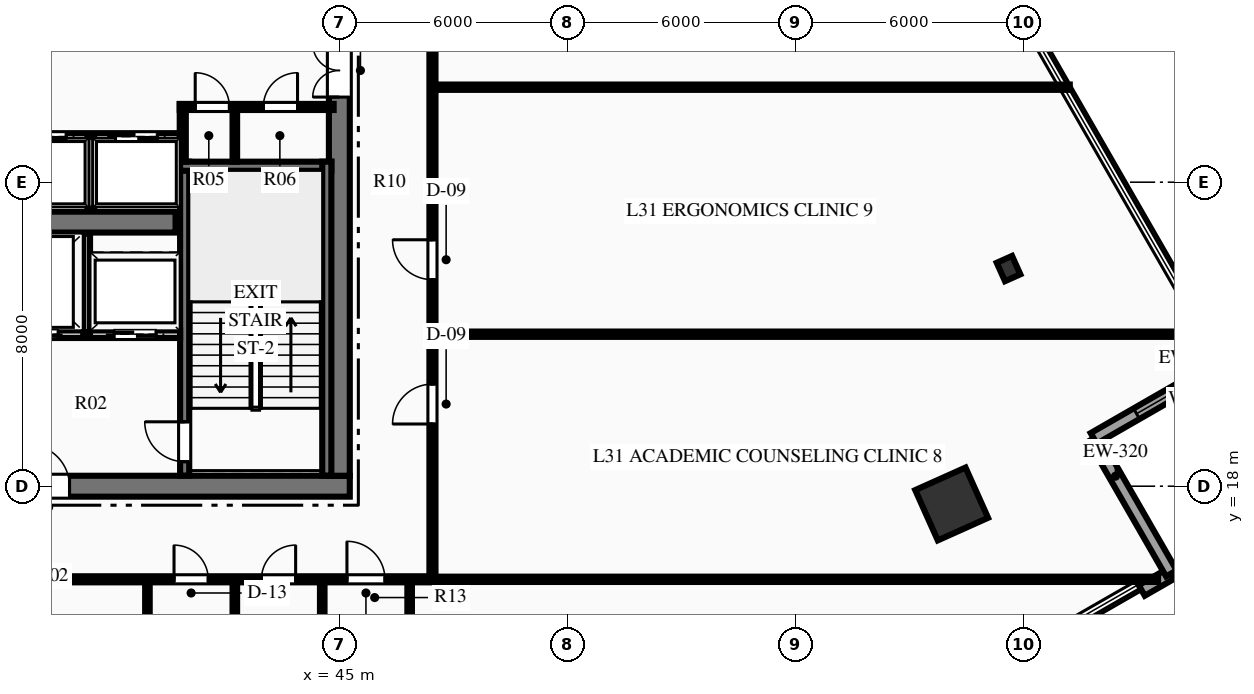
"""IFC4 building model, lengths in metres.
Left out: names, types, materials, properties, quantities, classifications, styles, units other than length and angle.
Written with IfcOpenShell. Run it as: python <this file> out.ifc"""

import sys

from ifc_helpers import new_model, si_unit, direction, frame, frame_2d, origin, origin_2d, place, context, subcontext, project, spatial, rectangle, hollow_rectangle, i_section, extrude, element, fill, save


model = new_model("IFC4")
c1 = context("Model", 3, precision=1e-05, world=origin(), true_north=direction((0.0, 1.0)))
c2 = subcontext(c1, "Body", "Model", "MODEL_VIEW")
j1 = project(units=[si_unit("LENGTHUNIT", "METRE"), si_unit("PLANEANGLEUNIT", "RADIAN")], contexts=[c1])
p1 = place(None, origin())
s1 = spatial("IfcSite", under=j1, at=p1, CompositionType="ELEMENT")
p2 = place(p1, origin())
s2 = spatial("IfcBuilding", under=s1, at=p2, CompositionType="ELEMENT")
p3 = place(p2, frame((0.0, 0.0, 127.95)))
s3 = spatial("IfcBuildingStorey", under=s2, at=p3, CompositionType="ELEMENT", Elevation=127.95)
p4 = place(p3, frame((26.725, 18.0, 0.0), z_axis=(0.0, 0.0, 1.0), x_axis=(1.0, 0.0, 0.0)))
e1 = element("IfcWall", 1, at=p4, inside=s3, PredefinedType="SHEAR", context=c2, shape_type="SweptSolid", body=[
    extrude(rectangle(XDim=18.55, YDim=0.55, at=frame_2d((9.275, 0.0))), origin(), (0.0, 0.0, 1.0), 3.75),
])
p5 = place(p4, frame((7.375, 0.0, 0.0)))
e2 = element("IfcOpeningElement", 2, at=p5, cuts=e1, PredefinedType="OPENING", context=c2, shape_type="SweptSolid", body=[
    extrude(rectangle(XDim=1.1, YDim=2.15, at=frame_2d((0.55, 1.075))), frame((0.0, 0.285, 0.0), z_axis=(0.0, -1.0, 0.0), x_axis=(1.0, 0.0, 0.0)), (0.0, 0.0, 1.0), 0.57),
])
p6 = place(p4, frame((10.075, 0.0, 0.0)))
e3 = element("IfcOpeningElement", 3, at=p6, cuts=e1, PredefinedType="OPENING", context=c2, shape_type="SweptSolid", body=[
    extrude(rectangle(XDim=1.1, YDim=2.15, at=frame_2d((0.55, 1.075))), frame((0.0, 0.285, 0.0), z_axis=(0.0, -1.0, 0.0), x_axis=(1.0, 0.0, 0.0)), (0.0, 0.0, 1.0), 0.57),
])
p7 = place(p3, frame((45.0, 18.275, 0.0), z_axis=(0.0, 0.0, 1.0), x_axis=(0.0, 1.0, 0.0)))
e4 = element("IfcWall", 4, at=p7, inside=s3, PredefinedType="SHEAR", context=c2, shape_type="SweptSolid", body=[
    extrude(rectangle(XDim=15.45, YDim=0.55, at=frame_2d((7.725, 0.0))), origin(), (0.0, 0.0, 1.0), 3.75),
])
p8 = place(p7, frame((9.965, 0.0, 0.0)))
e5 = element("IfcOpeningElement", 5, at=p8, cuts=e4, PredefinedType="OPENING", context=c2, shape_type="SweptSolid", body=[
    extrude(rectangle(XDim=1.4, YDim=2.2, at=frame_2d((0.7, 1.1))), frame((0.0, 0.285, 0.0), z_axis=(0.0, -1.0, 0.0), x_axis=(1.0, 0.0, 0.0)), (0.0, 0.0, 1.0), 0.57),
])
p9 = place(p3, frame((31.31, 24.95, 0.0), z_axis=(0.0, 0.0, 1.0), x_axis=(1.0, 0.0, 0.0)))
e6 = element("IfcWall", 6, at=p9, inside=s3, PredefinedType="SHEAR", context=c2, shape_type="SweptSolid", body=[
    extrude(rectangle(XDim=9.38, YDim=0.55, at=frame_2d((4.69, 0.0))), origin(), (0.0, 0.0, 1.0), 3.75),
])
p10 = place(p3, frame((40.93, 18.28, 0.0), z_axis=(0.0, 0.0, 1.0), x_axis=(0.0, 1.0, 0.0)))
e7 = element("IfcWall", 7, at=p10, inside=s3, PredefinedType="SHEAR", context=c2, shape_type="SweptSolid", body=[
    extrude(rectangle(XDim=8.26, YDim=0.24, at=frame_2d((4.13, 0.0))), origin(), (0.0, 0.0, 1.0), 3.75),
])
p11 = place(p10, frame((0.365, 0.0, 0.0)))
e8 = element("IfcOpeningElement", 8, at=p11, cuts=e7, PredefinedType="OPENING", context=c2, shape_type="SweptSolid", body=[
    extrude(rectangle(XDim=1.05, YDim=2.15, at=frame_2d((0.525, 1.075))), frame((0.0, 0.13, 0.0), z_axis=(0.0, -1.0, 0.0), x_axis=(1.0, 0.0, 0.0)), (0.0, 0.0, 1.0), 0.26),
])
p12 = place(p3, frame((40.81, 26.42, 0.0), z_axis=(0.0, 0.0, 1.0), x_axis=(1.0, 0.0, 0.0)))
e9 = element("IfcWall", 9, at=p12, inside=s3, PredefinedType="SHEAR", context=c2, shape_type="SweptSolid", body=[
    extrude(rectangle(XDim=3.98, YDim=0.24, at=frame_2d((1.99, 0.0))), origin(), (0.0, 0.0, 1.0), 3.75),
])
p13 = place(p3, frame((44.67, 18.28, 0.0), z_axis=(0.0, 0.0, 1.0), x_axis=(0.0, 1.0, 0.0)))
e10 = element("IfcWall", 10, at=p13, inside=s3, PredefinedType="SHEAR", context=c2, shape_type="SweptSolid", body=[
    extrude(rectangle(XDim=8.26, YDim=0.24, at=frame_2d((4.13, 0.0))), origin(), (0.0, 0.0, 1.0), 3.75),
])
p14 = place(p3, frame((61.112, 17.533, 0.0), z_axis=(0.0, 0.0, 1.0), x_axis=(0.912477494148, 0.409126902895, 0.0)))
e11 = element("IfcColumn", 11, at=p14, inside=s3, PredefinedType="COLUMN", context=c2, shape_type="SweptSolid", body=[
    extrude(hollow_rectangle(XDim=1.45, YDim=1.45, WallThickness=0.07, at=origin_2d()), origin(), (0.0, 0.0, 1.0), 3.75),
])
p15 = place(p3, frame((62.609, 23.727, 0.0), z_axis=(0.0, 0.0, 1.0), x_axis=(0.912477494148, 0.409126902895, 0.0)))
e12 = element("IfcColumn", 12, at=p15, inside=s3, PredefinedType="COLUMN", context=c2, shape_type="SweptSolid", body=[
    extrude(i_section(OverallWidth=0.442, OverallDepth=0.531, WebThickness=0.066, FlangeThickness=0.106, at=origin_2d()), origin(), (0.0, 0.0, 1.0), 3.75),
])
p16 = place(p3, frame((66.894, 15.705, 0.0), z_axis=(0.0, 0.0, 1.0), x_axis=(-0.866871138283, -0.498532275396, 0.0)))
e13 = element("IfcWall", 13, at=p16, inside=s3, PredefinedType="STANDARD", context=c2, shape_type="SweptSolid", body=[
    extrude(rectangle(XDim=0.9, YDim=0.32, at=frame_2d((0.45, 0.0))), origin(), (0.0, 0.0, 1.0), 3.4),
])
p17 = place(p3, frame((64.85, 19.259, 0.0), z_axis=(0.0, 0.0, 1.0), x_axis=(0.498522586698, -0.866876710122, 0.0)))
e14 = element("IfcWall", 14, at=p17, inside=s3, PredefinedType="STANDARD", context=c2, shape_type="SweptSolid", body=[
    extrude(rectangle(XDim=4.1, YDim=0.32, at=frame_2d((2.05, 0.0))), origin(), (0.0, 0.0, 1.0), 3.4),
])
p18 = place(p3, frame((68.405, 21.303, 0.0), z_axis=(0.0, 0.0, 1.0), x_axis=(-0.866917238564, -0.498452105503, 0.0)))
e15 = element("IfcWall", 15, at=p18, inside=s3, PredefinedType="STANDARD", context=c2, shape_type="SweptSolid", body=[
    extrude(rectangle(XDim=4.1, YDim=0.32, at=frame_2d((2.05, 0.0))), origin(), (0.0, 0.0, 1.0), 3.4),
])
p19 = place(p18, frame((1.3, 0.0, 0.85)))
e16 = element("IfcOpeningElement", 16, at=p19, cuts=e15, PredefinedType="OPENING", context=c2, shape_type="SweptSolid", body=[
    extrude(rectangle(XDim=1.5, YDim=2.1, at=frame_2d((0.75, 1.05))), frame((0.0, 0.17, 0.0), z_axis=(0.0, -1.0, 0.0), x_axis=(1.0, 0.0, 0.0)), (0.0, 0.0, 1.0), 0.34),
])
p20 = place(p3, frame((36.12, 22.0, 0.0), z_axis=(0.0, 0.0, 1.0), x_axis=(1.0, 0.0, 0.0)))
e17 = element("IfcWall", 17, at=p20, inside=s3, PredefinedType="PARTITIONING", context=c2, shape_type="SweptSolid", body=[
    extrude(rectangle(XDim=4.69, YDim=0.2, at=frame_2d((2.345, 0.0))), origin(), (0.0, 0.0, 1.0), 3.4),
])
p21 = place(p20, frame((2.955, 0.0, 0.0)))
e18 = element("IfcOpeningElement", 18, at=p21, cuts=e17, PredefinedType="OPENING", context=c2, shape_type="SweptSolid", body=[
    extrude(rectangle(XDim=1.1, YDim=2.15, at=frame_2d((0.55, 1.075))), frame((0.0, 0.11, 0.0), z_axis=(0.0, -1.0, 0.0), x_axis=(1.0, 0.0, 0.0)), (0.0, 0.0, 1.0), 0.22),
])
p22 = place(p20, frame((0.08, 0.0, 0.0)))
e19 = element("IfcOpeningElement", 19, at=p22, cuts=e17, PredefinedType="OPENING", context=c2, shape_type="SweptSolid", body=[
    extrude(rectangle(XDim=1.4, YDim=2.2, at=frame_2d((0.7, 1.1))), frame((0.0, 0.11, 0.0), z_axis=(0.0, -1.0, 0.0), x_axis=(1.0, 0.0, 0.0)), (0.0, 0.0, 1.0), 0.22),
])
p23 = place(p3, frame((38.35, 22.05, 0.0), z_axis=(0.0, 0.0, 1.0), x_axis=(0.0, 1.0, 0.0)))
e20 = element("IfcWall", 20, at=p23, inside=s3, PredefinedType="PARTITIONING", context=c2, shape_type="SweptSolid", body=[
    extrude(rectangle(XDim=2.6, YDim=0.18, at=frame_2d((1.3, 0.0))), origin(), (0.0, 0.0, 1.0), 3.4),
])
p24 = place(p3, frame((40.8, 27.98, 0.0), z_axis=(0.0, 0.0, 1.0), x_axis=(1.0, 0.0, 0.0)))
e21 = element("IfcWall", 21, at=p24, inside=s3, PredefinedType="PARTITIONING", context=c2, shape_type="SweptSolid", body=[
    extrude(rectangle(XDim=4.05, YDim=0.16, at=frame_2d((2.025, 0.0))), origin(), (0.0, 0.0, 1.0), 3.4),
])
p25 = place(p24, frame((0.407, 0.0, 0.0)))
e22 = element("IfcOpeningElement", 22, at=p25, cuts=e21, PredefinedType="OPENING", context=c2, shape_type="SweptSolid", body=[
    extrude(rectangle(XDim=0.9, YDim=2.15, at=frame_2d((0.45, 1.075))), frame((0.0, 0.09, 0.0), z_axis=(0.0, -1.0, 0.0), x_axis=(1.0, 0.0, 0.0)), (0.0, 0.0, 1.0), 0.18),
])
p26 = place(p24, frame((2.2, 0.0, 0.0)))
e23 = element("IfcOpeningElement", 23, at=p26, cuts=e21, PredefinedType="OPENING", context=c2, shape_type="SweptSolid", body=[
    extrude(rectangle(XDim=0.9, YDim=2.15, at=frame_2d((0.45, 1.075))), frame((0.0, 0.09, 0.0), z_axis=(0.0, -1.0, 0.0), x_axis=(1.0, 0.0, 0.0)), (0.0, 0.0, 1.0), 0.18),
])
p27 = place(p3, frame((40.88, 26.54, 0.0), z_axis=(0.0, 0.0, 1.0), x_axis=(0.0, 1.0, 0.0)))
e24 = element("IfcWall", 24, at=p27, inside=s3, PredefinedType="PARTITIONING", context=c2, shape_type="SweptSolid", body=[
    extrude(rectangle(XDim=1.51, YDim=0.16, at=frame_2d((0.755, 0.0))), origin(), (0.0, 0.0, 1.0), 3.4),
])
p28 = place(p3, frame((42.25, 26.54, 0.0), z_axis=(0.0, 0.0, 1.0), x_axis=(0.0, 1.0, 0.0)))
e25 = element("IfcWall", 25, at=p28, inside=s3, PredefinedType="PARTITIONING", context=c2, shape_type="SweptSolid", body=[
    extrude(rectangle(XDim=1.44, YDim=0.12, at=frame_2d((0.72, 0.0))), origin(), (0.0, 0.0, 1.0), 3.4),
])
p29 = place(p3, frame((31.2, 27.2, 0.0), z_axis=(0.0, 0.0, 1.0), x_axis=(1.0, 0.0, 0.0)))
e26 = element("IfcWall", 26, at=p29, inside=s3, PredefinedType="PARTITIONING", context=c2, shape_type="SweptSolid", body=[
    extrude(rectangle(XDim=9.6, YDim=0.18, at=frame_2d((4.8, 0.0))), origin(), (0.0, 0.0, 1.0), 3.4),
])
p30 = place(p29, frame((0.59, 0.0, 0.0)))
e27 = element("IfcOpeningElement", 27, at=p30, cuts=e26, PredefinedType="OPENING", context=c2, shape_type="SweptSolid", body=[
    extrude(rectangle(XDim=1.1, YDim=2.15, at=frame_2d((0.55, 1.075))), frame((0.0, 0.1, 0.0), z_axis=(0.0, -1.0, 0.0), x_axis=(1.0, 0.0, 0.0)), (0.0, 0.0, 1.0), 0.2),
])
p31 = place(p29, frame((2.99, 0.0, 0.0)))
e28 = element("IfcOpeningElement", 28, at=p31, cuts=e26, PredefinedType="OPENING", context=c2, shape_type="SweptSolid", body=[
    extrude(rectangle(XDim=1.1, YDim=2.15, at=frame_2d((0.55, 1.075))), frame((0.0, 0.1, 0.0), z_axis=(0.0, -1.0, 0.0), x_axis=(1.0, 0.0, 0.0)), (0.0, 0.0, 1.0), 0.2),
])
p32 = place(p29, frame((5.51, 0.0, 0.0)))
e29 = element("IfcOpeningElement", 29, at=p32, cuts=e26, PredefinedType="OPENING", context=c2, shape_type="SweptSolid", body=[
    extrude(rectangle(XDim=1.1, YDim=2.15, at=frame_2d((0.55, 1.075))), frame((0.0, 0.1, 0.0), z_axis=(0.0, -1.0, 0.0), x_axis=(1.0, 0.0, 0.0)), (0.0, 0.0, 1.0), 0.2),
])
p33 = place(p29, frame((7.91, 0.0, 0.0)))
e30 = element("IfcOpeningElement", 30, at=p33, cuts=e26, PredefinedType="OPENING", context=c2, shape_type="SweptSolid", body=[
    extrude(rectangle(XDim=1.1, YDim=2.15, at=frame_2d((0.55, 1.075))), frame((0.0, 0.1, 0.0), z_axis=(0.0, -1.0, 0.0), x_axis=(1.0, 0.0, 0.0)), (0.0, 0.0, 1.0), 0.2),
])
p34 = place(p3, frame((38.46, 25.3, 0.0), z_axis=(0.0, 0.0, 1.0), x_axis=(0.0, 1.0, 0.0)))
e31 = element("IfcWall", 31, at=p34, inside=s3, PredefinedType="PARTITIONING", context=c2, shape_type="SweptSolid", body=[
    extrude(rectangle(XDim=1.9, YDim=0.18, at=frame_2d((0.95, 0.0))), origin(), (0.0, 0.0, 1.0), 3.4),
])
p35 = place(p3, frame((24.5, 15.55, 0.0), z_axis=(0.0, 0.0, 1.0), x_axis=(1.0, 0.0, 0.0)))
e32 = element("IfcWall", 32, at=p35, inside=s3, PredefinedType="PARTITIONING", context=c2, shape_type="SweptSolid", body=[
    extrude(rectangle(XDim=23.0, YDim=0.16, at=frame_2d((11.5, 0.0))), origin(), (0.0, 0.0, 1.0), 3.4),
])
p36 = place(p35, frame((16.15, 0.0, 0.0)))
e33 = element("IfcOpeningElement", 33, at=p36, cuts=e32, PredefinedType="OPENING", context=c2, shape_type="SweptSolid", body=[
    extrude(rectangle(XDim=0.9, YDim=2.15, at=frame_2d((0.45, 1.075))), frame((0.0, 0.09, 0.0), z_axis=(0.0, -1.0, 0.0), x_axis=(1.0, 0.0, 0.0)), (0.0, 0.0, 1.0), 0.18),
])
p37 = place(p35, frame((18.45, 0.0, 0.0)))
e34 = element("IfcOpeningElement", 34, at=p37, cuts=e32, PredefinedType="OPENING", context=c2, shape_type="SweptSolid", body=[
    extrude(rectangle(XDim=0.9, YDim=2.15, at=frame_2d((0.45, 1.075))), frame((0.0, 0.09, 0.0), z_axis=(0.0, -1.0, 0.0), x_axis=(1.0, 0.0, 0.0)), (0.0, 0.0, 1.0), 0.18),
])
p38 = place(p35, frame((20.7, 0.0, 0.0)))
e35 = element("IfcOpeningElement", 35, at=p38, cuts=e32, PredefinedType="OPENING", context=c2, shape_type="SweptSolid", body=[
    extrude(rectangle(XDim=1.0, YDim=2.15, at=frame_2d((0.5, 1.075))), frame((0.0, 0.09, 0.0), z_axis=(0.0, -1.0, 0.0), x_axis=(1.0, 0.0, 0.0)), (0.0, 0.0, 1.0), 0.18),
])
p39 = place(p35, frame((3.781, 0.0, 0.0)))
e36 = element("IfcOpeningElement", 36, at=p39, cuts=e32, PredefinedType="OPENING", context=c2, shape_type="SweptSolid", body=[
    extrude(rectangle(XDim=1.05, YDim=2.15, at=frame_2d((0.525, 1.075))), frame((0.0, 0.09, 0.0), z_axis=(0.0, -1.0, 0.0), x_axis=(1.0, 0.0, 0.0)), (0.0, 0.0, 1.0), 0.18),
])
p40 = place(p35, frame((8.373, 0.0, 0.0)))
e37 = element("IfcOpeningElement", 37, at=p40, cuts=e32, PredefinedType="OPENING", context=c2, shape_type="SweptSolid", body=[
    extrude(rectangle(XDim=1.05, YDim=2.15, at=frame_2d((0.525, 1.075))), frame((0.0, 0.09, 0.0), z_axis=(0.0, -1.0, 0.0), x_axis=(1.0, 0.0, 0.0)), (0.0, 0.0, 1.0), 0.18),
])
p41 = place(p3, frame((47.45, 15.55, 0.0), z_axis=(0.0, 0.0, 1.0), x_axis=(0.0, 1.0, 0.0)))
e38 = element("IfcWall", 38, at=p41, inside=s3, PredefinedType="PARTITIONING", context=c2, shape_type="SweptSolid", body=[
    extrude(rectangle(XDim=20.9, YDim=0.16, at=frame_2d((10.45, 0.0))), origin(), (0.0, 0.0, 1.0), 3.4),
])
p42 = place(p41, frame((4.087, 0.0, 0.0)))
e39 = element("IfcOpeningElement", 39, at=p42, cuts=e38, PredefinedType="OPENING", context=c2, shape_type="SweptSolid", body=[
    extrude(rectangle(XDim=1.05, YDim=2.15, at=frame_2d((0.525, 1.075))), frame((0.0, 0.09, 0.0), z_axis=(0.0, -1.0, 0.0), x_axis=(1.0, 0.0, 0.0)), (0.0, 0.0, 1.0), 0.18),
])
p43 = place(p41, frame((7.885, 0.0, 0.0)))
e40 = element("IfcOpeningElement", 40, at=p43, cuts=e38, PredefinedType="OPENING", context=c2, shape_type="SweptSolid", body=[
    extrude(rectangle(XDim=1.05, YDim=2.15, at=frame_2d((0.525, 1.075))), frame((0.0, 0.09, 0.0), z_axis=(0.0, -1.0, 0.0), x_axis=(1.0, 0.0, 0.0)), (0.0, 0.0, 1.0), 0.18),
])
p44 = place(p41, frame((14.743, 0.0, 0.0)))
e41 = element("IfcOpeningElement", 41, at=p44, cuts=e38, PredefinedType="OPENING", context=c2, shape_type="SweptSolid", body=[
    extrude(rectangle(XDim=1.05, YDim=2.15, at=frame_2d((0.525, 1.075))), frame((0.0, 0.09, 0.0), z_axis=(0.0, -1.0, 0.0), x_axis=(1.0, 0.0, 0.0)), (0.0, 0.0, 1.0), 0.18),
])
for number, where, z_axis, x_axis in (
    (42, (39.95, 11.65, 0.0), (0.0, 0.0, 1.0), (0.0, 1.0, 0.0)),
    (43, (42.25, 11.65, 0.0), (0.0, 0.0, 1.0), (0.0, 1.0, 0.0)),
    (44, (44.55, 11.65, 0.0), (0.0, 0.0, 1.0), (0.0, 1.0, 0.0)),
    (45, (46.85, 11.65, 0.0), (0.0, 0.0, 1.0), (0.0, 1.0, 0.0)),
):
    element("IfcWall", number, at=place(p3, frame(where, z_axis=z_axis, x_axis=x_axis)), inside=s3, PredefinedType="PARTITIONING", context=c2, shape_type="SweptSolid", body=[
        extrude(rectangle(XDim=3.9, YDim=0.12, at=frame_2d((1.95, 0.0))), origin(), (0.0, 0.0, 1.0), 3.4),
    ])
p45 = place(p3, frame((47.45, 15.55, 0.0), z_axis=(0.0, 0.0, 1.0), x_axis=(1.0, 0.0, 0.0)))
e46 = element("IfcWall", 46, at=p45, inside=s3, PredefinedType="PARTITIONING", context=c2, shape_type="SweptSolid", body=[
    extrude(rectangle(XDim=19.094, YDim=0.14, at=frame_2d((9.547, 0.0))), origin(), (0.0, 0.0, 1.0), 3.4),
])
p46 = place(p3, frame((47.45, 22.0, 0.0), z_axis=(0.0, 0.0, 1.0), x_axis=(1.0, 0.0, 0.0)))
e47 = element("IfcWall", 47, at=p46, inside=s3, PredefinedType="PARTITIONING", context=c2, shape_type="SweptSolid", body=[
    extrude(rectangle(XDim=20.508, YDim=0.14, at=frame_2d((10.254, 0.0))), origin(), (0.0, 0.0, 1.0), 3.4),
])
p47 = place(p3, frame((47.45, 28.5, 0.0), z_axis=(0.0, 0.0, 1.0), x_axis=(1.0, 0.0, 0.0)))
e48 = element("IfcWall", 48, at=p47, inside=s3, PredefinedType="PARTITIONING", context=c2, shape_type="SweptSolid", body=[
    extrude(rectangle(XDim=16.77, YDim=0.14, at=frame_2d((8.385, 0.0))), origin(), (0.0, 0.0, 1.0), 3.4),
])
p48 = place(p19, origin())
e49 = element("IfcWindow", 49, at=p48, inside=s3, PartitioningType="SINGLE_PANEL", PredefinedType="WINDOW", context=c2, shape_type="SweptSolid", body=[
    extrude(rectangle(XDim=1.5, YDim=2.1, at=frame_2d((0.75, 1.05))), frame((0.0, 0.03, 0.0), z_axis=(0.0, -1.0, 0.0), x_axis=(1.0, 0.0, 0.0)), (0.0, 0.0, 1.0), 0.06),
])
fill(e16, e49)
p49 = place(p25, origin())
e50 = element("IfcDoor", 50, at=p49, inside=s3, OperationType="SINGLE_SWING_LEFT", PredefinedType="DOOR", context=c2, shape_type="SweptSolid", body=[
    extrude(rectangle(XDim=0.9, YDim=2.15, at=frame_2d((0.45, 1.075))), frame((0.0, 0.025, 0.0), z_axis=(0.0, -1.0, 0.0), x_axis=(1.0, 0.0, 0.0)), (0.0, 0.0, 1.0), 0.05),
])
fill(e22, e50)
p50 = place(p26, origin())
e51 = element("IfcDoor", 51, at=p50, inside=s3, OperationType="SINGLE_SWING_RIGHT", PredefinedType="DOOR", context=c2, shape_type="SweptSolid", body=[
    extrude(rectangle(XDim=0.9, YDim=2.15, at=frame_2d((0.45, 1.075))), frame((0.0, 0.025, 0.0), z_axis=(0.0, -1.0, 0.0), x_axis=(1.0, 0.0, 0.0)), (0.0, 0.0, 1.0), 0.05),
])
fill(e23, e51)
p51 = place(p11, origin())
e52 = element("IfcDoor", 52, at=p51, inside=s3, OperationType="SINGLE_SWING_RIGHT", PredefinedType="DOOR", context=c2, shape_type="SweptSolid", body=[
    extrude(rectangle(XDim=1.05, YDim=2.15, at=frame_2d((0.525, 1.075))), frame((0.0, 0.025, 0.0), z_axis=(0.0, -1.0, 0.0), x_axis=(1.0, 0.0, 0.0)), (0.0, 0.0, 1.0), 0.05),
])
fill(e8, e52)
p52 = place(p6, origin())
e53 = element("IfcDoor", 53, at=p52, inside=s3, OperationType="SINGLE_SWING_LEFT", PredefinedType="DOOR", context=c2, shape_type="SweptSolid", body=[
    extrude(rectangle(XDim=1.1, YDim=2.15, at=frame_2d((0.55, 1.075))), frame((0.0, 0.025, 0.0), z_axis=(0.0, -1.0, 0.0), x_axis=(1.0, 0.0, 0.0)), (0.0, 0.0, 1.0), 0.05),
])
fill(e3, e53)
p53 = place(p8, origin())
e54 = element("IfcDoor", 54, at=p53, inside=s3, OperationType="DOUBLE_DOOR_SINGLE_SWING", PredefinedType="DOOR", context=c2, shape_type="SweptSolid", body=[
    extrude(rectangle(XDim=1.4, YDim=2.2, at=frame_2d((0.7, 1.1))), frame((0.0, 0.025, 0.0), z_axis=(0.0, -1.0, 0.0), x_axis=(1.0, 0.0, 0.0)), (0.0, 0.0, 1.0), 0.05),
])
fill(e5, e54)
p54 = place(p36, origin())
e55 = element("IfcDoor", 55, at=p54, inside=s3, OperationType="SINGLE_SWING_LEFT", PredefinedType="DOOR", context=c2, shape_type="SweptSolid", body=[
    extrude(rectangle(XDim=0.9, YDim=2.15, at=frame_2d((0.45, 1.075))), frame((0.0, 0.025, 0.0), z_axis=(0.0, -1.0, 0.0), x_axis=(1.0, 0.0, 0.0)), (0.0, 0.0, 1.0), 0.05),
])
fill(e33, e55)
p55 = place(p37, origin())
e56 = element("IfcDoor", 56, at=p55, inside=s3, OperationType="SINGLE_SWING_RIGHT", PredefinedType="DOOR", context=c2, shape_type="SweptSolid", body=[
    extrude(rectangle(XDim=0.9, YDim=2.15, at=frame_2d((0.45, 1.075))), frame((0.0, 0.025, 0.0), z_axis=(0.0, -1.0, 0.0), x_axis=(1.0, 0.0, 0.0)), (0.0, 0.0, 1.0), 0.05),
])
fill(e34, e56)
p56 = place(p38, origin())
e57 = element("IfcDoor", 57, at=p56, inside=s3, OperationType="SINGLE_SWING_LEFT", PredefinedType="DOOR", context=c2, shape_type="SweptSolid", body=[
    extrude(rectangle(XDim=1.0, YDim=2.15, at=frame_2d((0.5, 1.075))), frame((0.0, 0.025, 0.0), z_axis=(0.0, -1.0, 0.0), x_axis=(1.0, 0.0, 0.0)), (0.0, 0.0, 1.0), 0.05),
])
fill(e35, e57)
p57 = place(p42, origin())
e58 = element("IfcDoor", 58, at=p57, inside=s3, OperationType="SINGLE_SWING_LEFT", PredefinedType="DOOR", context=c2, shape_type="SweptSolid", body=[
    extrude(rectangle(XDim=1.05, YDim=2.15, at=frame_2d((0.525, 1.075))), frame((0.0, 0.025, 0.0), z_axis=(0.0, -1.0, 0.0), x_axis=(1.0, 0.0, 0.0)), (0.0, 0.0, 1.0), 0.05),
])
fill(e39, e58)
p58 = place(p43, origin())
e59 = element("IfcDoor", 59, at=p58, inside=s3, OperationType="SINGLE_SWING_RIGHT", PredefinedType="DOOR", context=c2, shape_type="SweptSolid", body=[
    extrude(rectangle(XDim=1.05, YDim=2.15, at=frame_2d((0.525, 1.075))), frame((0.0, 0.025, 0.0), z_axis=(0.0, -1.0, 0.0), x_axis=(1.0, 0.0, 0.0)), (0.0, 0.0, 1.0), 0.05),
])
fill(e40, e59)
p59 = place(p32, origin())
e60 = element("IfcDoor", 60, at=p59, inside=s3, OperationType="SLIDING_TO_LEFT", PredefinedType="DOOR", context=c2, shape_type="SweptSolid", body=[
    extrude(rectangle(XDim=1.1, YDim=2.15, at=frame_2d((0.55, 1.075))), frame((0.0, 0.025, 0.0), z_axis=(0.0, -1.0, 0.0), x_axis=(1.0, 0.0, 0.0)), (0.0, 0.0, 1.0), 0.05),
])
fill(e29, e60)
p60 = place(p33, origin())
e61 = element("IfcDoor", 61, at=p60, inside=s3, OperationType="SLIDING_TO_LEFT", PredefinedType="DOOR", context=c2, shape_type="SweptSolid", body=[
    extrude(rectangle(XDim=1.1, YDim=2.15, at=frame_2d((0.55, 1.075))), frame((0.0, 0.025, 0.0), z_axis=(0.0, -1.0, 0.0), x_axis=(1.0, 0.0, 0.0)), (0.0, 0.0, 1.0), 0.05),
])
fill(e30, e61)
p61 = place(p21, origin())
e62 = element("IfcDoor", 62, at=p61, inside=s3, OperationType="SLIDING_TO_LEFT", PredefinedType="DOOR", context=c2, shape_type="SweptSolid", body=[
    extrude(rectangle(XDim=1.1, YDim=2.15, at=frame_2d((0.55, 1.075))), frame((0.0, 0.025, 0.0), z_axis=(0.0, -1.0, 0.0), x_axis=(1.0, 0.0, 0.0)), (0.0, 0.0, 1.0), 0.05),
])
fill(e18, e62)
p62 = place(p22, origin())
e63 = element("IfcDoor", 63, at=p62, inside=s3, OperationType="SLIDING_TO_LEFT", PredefinedType="DOOR", context=c2, shape_type="SweptSolid", body=[
    extrude(rectangle(XDim=1.4, YDim=2.2, at=frame_2d((0.7, 1.1))), frame((0.0, 0.025, 0.0), z_axis=(0.0, -1.0, 0.0), x_axis=(1.0, 0.0, 0.0)), (0.0, 0.0, 1.0), 0.05),
])
fill(e19, e63)
save(model, sys.argv[1])
